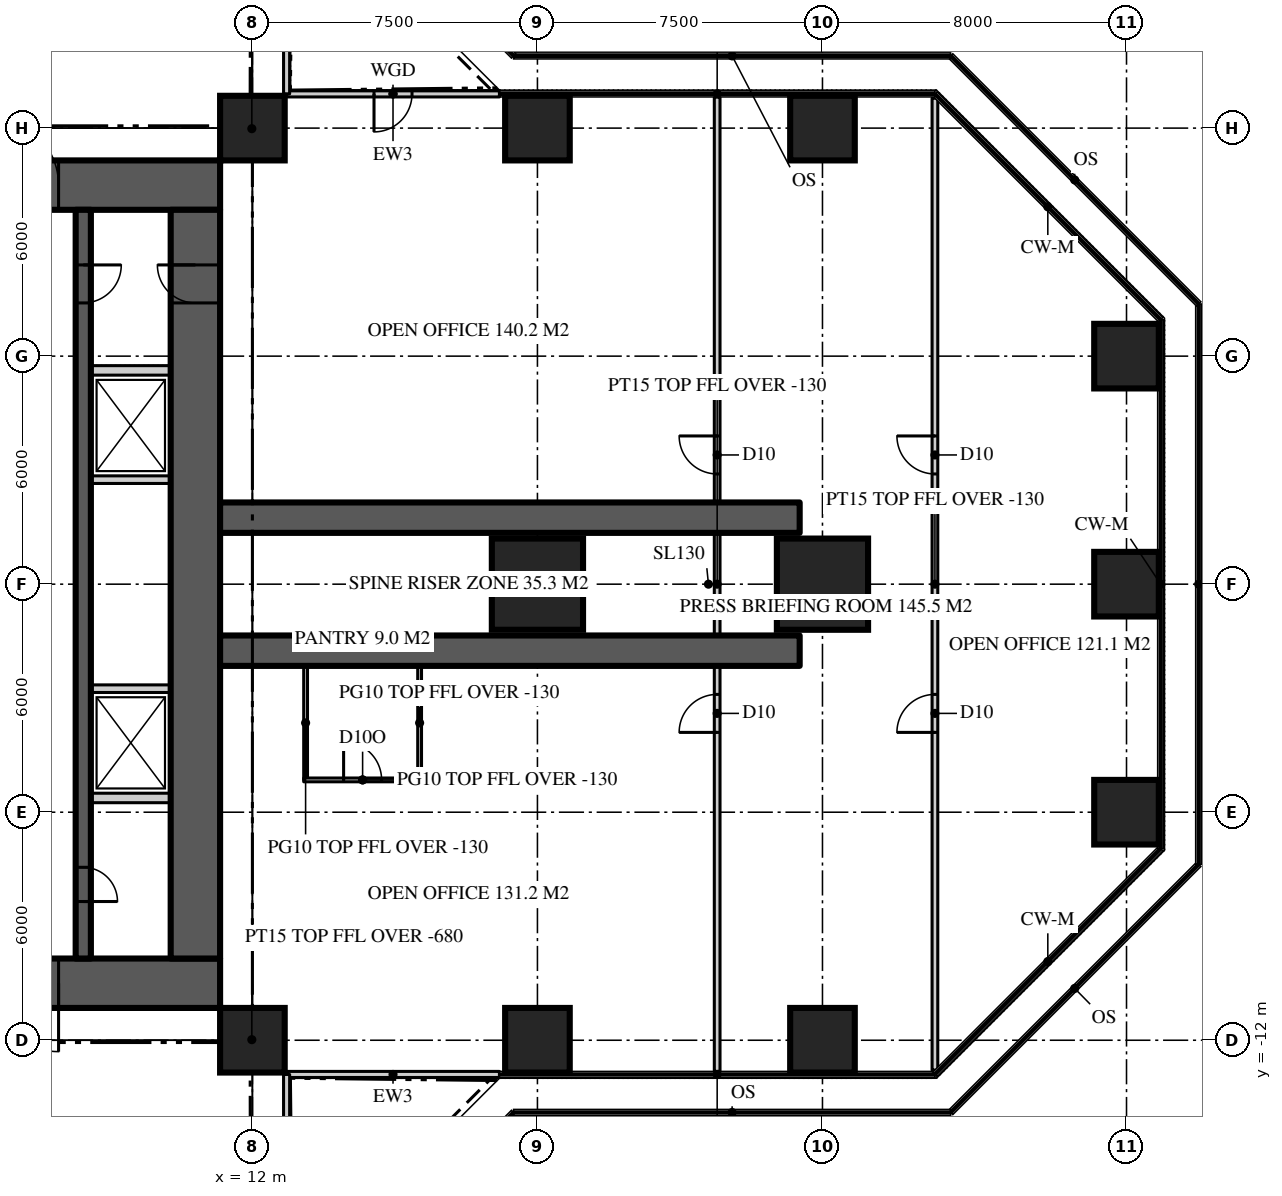
"""IFC4 building model, lengths in metres.
Left out: names, types, materials, properties, quantities, classifications, styles, units other than length and angle.
Written with IfcOpenShell. Run it as: python <this file> out.ifc"""

import sys

from ifc_helpers import new_model, si_unit, direction, frame, frame_2d, origin, origin_2d, place, context, subcontext, project, spatial, rectangle, extrude, element, fill, save


model = new_model("IFC4")
c1 = context("Model", 3, precision=1e-05, world=origin(), true_north=direction((0.0, 1.0)))
c2 = subcontext(c1, "Body", "Model", "MODEL_VIEW")
j1 = project(units=[si_unit("LENGTHUNIT", "METRE"), si_unit("PLANEANGLEUNIT", "RADIAN")], contexts=[c1])
p1 = place(None, origin())
s1 = spatial("IfcSite", under=j1, at=p1, CompositionType="ELEMENT")
p2 = place(p1, origin())
s2 = spatial("IfcBuilding", under=s1, at=p2, CompositionType="ELEMENT")
p3 = place(p2, frame((0.0, 0.0, 178.8)))
s3 = spatial("IfcBuildingStorey", under=s2, at=p3, CompositionType="ELEMENT", Elevation=178.8)
p4 = place(p3, frame((-11.15, 10.5, 0.0), z_axis=(0.0, 0.0, 1.0), x_axis=(1.0, 0.0, 0.0)))
e1 = element("IfcWall", 1, at=p4, inside=s3, PredefinedType="SHEAR", context=c2, shape_type="SweptSolid", body=[
    extrude(rectangle(XDim=22.3, YDim=1.3, at=frame_2d((11.15, 0.0))), origin(), (0.0, 0.0, 1.0), 3.9),
])
p5 = place(p4, frame((4.25, 0.0, 0.0)))
e2 = element("IfcOpeningElement", 2, at=p5, cuts=e1, PredefinedType="OPENING", context=c2, shape_type="SweptSolid", body=[
    extrude(rectangle(XDim=1.8, YDim=2.2, at=frame_2d((0.9, 1.1))), frame((0.0, 0.66, 0.0), z_axis=(0.0, -1.0, 0.0), x_axis=(1.0, 0.0, 0.0)), (0.0, 0.0, 1.0), 1.32),
])
p6 = place(p4, frame((16.25, 0.0, 0.0)))
e3 = element("IfcOpeningElement", 3, at=p6, cuts=e1, PredefinedType="OPENING", context=c2, shape_type="SweptSolid", body=[
    extrude(rectangle(XDim=1.8, YDim=2.2, at=frame_2d((0.9, 1.1))), frame((0.0, 0.66, 0.0), z_axis=(0.0, -1.0, 0.0), x_axis=(1.0, 0.0, 0.0)), (0.0, 0.0, 1.0), 1.32),
])
p7 = place(p3, frame((11.15, -10.5, 0.0), z_axis=(0.0, 0.0, 1.0), x_axis=(-1.0, 0.0, 0.0)))
e4 = element("IfcWall", 4, at=p7, inside=s3, PredefinedType="SHEAR", context=c2, shape_type="SweptSolid", body=[
    extrude(rectangle(XDim=22.3, YDim=1.3, at=frame_2d((11.15, 0.0))), origin(), (0.0, 0.0, 1.0), 3.9),
])
p8 = place(p7, frame((16.25, 0.0, 0.0)))
e5 = element("IfcOpeningElement", 5, at=p8, cuts=e4, PredefinedType="OPENING", context=c2, shape_type="SweptSolid", body=[
    extrude(rectangle(XDim=1.8, YDim=2.2, at=frame_2d((0.9, 1.1))), frame((0.0, 0.66, 0.0), z_axis=(0.0, -1.0, 0.0), x_axis=(1.0, 0.0, 0.0)), (0.0, 0.0, 1.0), 1.32),
])
p9 = place(p7, frame((4.25, 0.0, 0.0)))
e6 = element("IfcOpeningElement", 6, at=p9, cuts=e4, PredefinedType="OPENING", context=c2, shape_type="SweptSolid", body=[
    extrude(rectangle(XDim=1.8, YDim=2.2, at=frame_2d((0.9, 1.1))), frame((0.0, 0.66, 0.0), z_axis=(0.0, -1.0, 0.0), x_axis=(1.0, 0.0, 0.0)), (0.0, 0.0, 1.0), 1.32),
])
p10 = place(p3, frame((10.5, -9.85, 0.0), z_axis=(0.0, 0.0, 1.0), x_axis=(0.0, 1.0, 0.0)))
e7 = element("IfcWall", 7, at=p10, inside=s3, PredefinedType="SHEAR", context=c2, shape_type="SweptSolid", body=[
    extrude(rectangle(XDim=19.7, YDim=1.3, at=frame_2d((9.85, 0.0))), origin(), (0.0, 0.0, 1.0), 3.9),
])
p11 = place(p10, frame((17.25, 0.0, 0.0)))
e8 = element("IfcOpeningElement", 8, at=p11, cuts=e7, PredefinedType="OPENING", context=c2, shape_type="SweptSolid", body=[
    extrude(rectangle(XDim=1.0, YDim=2.2, at=frame_2d((0.5, 1.1))), frame((0.0, 0.66, 0.0), z_axis=(0.0, -1.0, 0.0), x_axis=(1.0, 0.0, 0.0)), (0.0, 0.0, 1.0), 1.32),
])
for number, where, z_axis, x_axis in (
    (9, (11.15, -1.75, 0.0), (0.0, 0.0, 1.0), (1.0, 0.0, 0.0)),
    (10, (11.15, 1.75, 0.0), (0.0, 0.0, 1.0), (1.0, 0.0, 0.0)),
):
    element("IfcWall", number, at=place(p3, frame(where, z_axis=z_axis, x_axis=x_axis)), inside=s3, PredefinedType="SHEAR", context=c2, shape_type="SweptSolid", body=[
        extrude(rectangle(XDim=15.25, YDim=0.8, at=frame_2d((7.625, 0.0))), origin(), (0.0, 0.0, 1.0), 3.9),
    ])
for number, where, z_axis, x_axis in (
    (11, (12.0, -12.0, 0.0), (0.0, 0.0, 1.0), (1.0, 0.0, 0.0)),
    (12, (19.5, -12.0, 0.0), (0.0, 0.0, 1.0), (1.0, 0.0, 0.0)),
    (13, (27.0, -12.0, 0.0), (0.0, 0.0, 1.0), (1.0, 0.0, 0.0)),
    (14, (35.0, -6.0, 0.0), (0.0, 0.0, 1.0), (1.0, 0.0, 0.0)),
):
    element("IfcColumn", number, at=place(p3, frame(where, z_axis=z_axis, x_axis=x_axis)), inside=s3, PredefinedType="COLUMN", context=c2, shape_type="SweptSolid", body=[
        extrude(rectangle(XDim=1.7, YDim=1.7, at=origin_2d()), origin(), (0.0, 0.0, 1.0), 3.9),
    ])
for number, where, z_axis, x_axis in (
    (15, (19.5, 0.0, 0.0), (0.0, 0.0, 1.0), (1.0, 0.0, 0.0)),
    (16, (27.0, 0.0, 0.0), (0.0, 0.0, 1.0), (1.0, 0.0, 0.0)),
):
    element("IfcColumn", number, at=place(p3, frame(where, z_axis=z_axis, x_axis=x_axis)), inside=s3, PredefinedType="COLUMN", context=c2, shape_type="SweptSolid", body=[
        extrude(rectangle(XDim=2.4, YDim=2.4, at=origin_2d()), origin(), (0.0, 0.0, 1.0), 3.9),
    ])
for number, where, z_axis, x_axis in (
    (17, (35.0, 0.0, 0.0), (0.0, 0.0, 1.0), (1.0, 0.0, 0.0)),
    (18, (35.0, 6.0, 0.0), (0.0, 0.0, 1.0), (1.0, 0.0, 0.0)),
    (19, (12.0, 12.0, 0.0), (0.0, 0.0, 1.0), (1.0, 0.0, 0.0)),
    (20, (19.5, 12.0, 0.0), (0.0, 0.0, 1.0), (1.0, 0.0, 0.0)),
    (21, (27.0, 12.0, 0.0), (0.0, 0.0, 1.0), (1.0, 0.0, 0.0)),
):
    element("IfcColumn", number, at=place(p3, frame(where, z_axis=z_axis, x_axis=x_axis)), inside=s3, PredefinedType="COLUMN", context=c2, shape_type="SweptSolid", body=[
        extrude(rectangle(XDim=1.7, YDim=1.7, at=origin_2d()), origin(), (0.0, 0.0, 1.0), 3.9),
    ])
p12 = place(p3, frame((12.9, -12.9, 0.0), z_axis=(0.0, 0.0, 1.0), x_axis=(1.0, 0.0, 0.0)))
e22 = element("IfcWall", 22, at=p12, inside=s3, PredefinedType="SOLIDWALL", context=c2, shape_type="SweptSolid", body=[
    extrude(rectangle(XDim=5.6, YDim=0.16, at=frame_2d((2.8, 0.0))), origin(), (0.0, 0.0, 1.0), 3.77),
])
p13 = place(p3, frame((18.5, 12.9, 0.0), z_axis=(0.0, 0.0, 1.0), x_axis=(-1.0, 0.0, 0.0)))
e23 = element("IfcWall", 23, at=p13, inside=s3, PredefinedType="SOLIDWALL", context=c2, shape_type="SweptSolid", body=[
    extrude(rectangle(XDim=5.6, YDim=0.16, at=frame_2d((2.8, 0.0))), origin(), (0.0, 0.0, 1.0), 3.77),
])
p14 = place(p13, frame((2.3, 0.0, 0.0)))
e24 = element("IfcOpeningElement", 24, at=p14, cuts=e23, PredefinedType="OPENING", context=c2, shape_type="SweptSolid", body=[
    extrude(rectangle(XDim=1.0, YDim=2.2, at=frame_2d((0.5, 1.1))), frame((0.0, 0.09, 0.0), z_axis=(0.0, -1.0, 0.0), x_axis=(1.0, 0.0, 0.0)), (0.0, 0.0, 1.0), 0.18),
])
p15 = place(p3, frame((12.9, 12.9, 0.0), z_axis=(0.0, 0.0, 1.0), x_axis=(0.0, 1.0, 0.0)))
e25 = element("IfcWall", 25, at=p15, inside=s3, PredefinedType="SOLIDWALL", context=c2, shape_type="SweptSolid", body=[
    extrude(rectangle(XDim=5.6, YDim=0.16, at=frame_2d((2.8, 0.0))), origin(), (0.0, 0.0, 1.0), 3.77),
])
p16 = place(p3, frame((12.9, -18.5, 0.0), z_axis=(0.0, 0.0, 1.0), x_axis=(0.0, 1.0, 0.0)))
e26 = element("IfcWall", 26, at=p16, inside=s3, PredefinedType="SOLIDWALL", context=c2, shape_type="SweptSolid", body=[
    extrude(rectangle(XDim=5.6, YDim=0.16, at=frame_2d((2.8, 0.0))), origin(), (0.0, 0.0, 1.0), 3.77),
])
p17 = place(p16, frame((2.3, 0.0, 0.0)))
e27 = element("IfcOpeningElement", 27, at=p17, cuts=e26, PredefinedType="OPENING", context=c2, shape_type="SweptSolid", body=[
    extrude(rectangle(XDim=1.0, YDim=2.2, at=frame_2d((0.5, 1.1))), frame((0.0, 0.09, 0.0), z_axis=(0.0, -1.0, 0.0), x_axis=(1.0, 0.0, 0.0)), (0.0, 0.0, 1.0), 0.18),
])
p18 = place(p3, frame((7.55, 9.85, 0.0), z_axis=(0.0, 0.0, 1.0), x_axis=(0.0, -1.0, 0.0)))
e28 = element("IfcWall", 28, at=p18, inside=s3, PredefinedType="SHEAR", context=c2, shape_type="SweptSolid", body=[
    extrude(rectangle(XDim=19.7, YDim=0.4, at=frame_2d((9.85, 0.0))), origin(), (0.0, 0.0, 1.0), 3.9),
])
p19 = place(p18, frame((1.45, 0.0, 0.0)))
e29 = element("IfcOpeningElement", 29, at=p19, cuts=e28, PredefinedType="OPENING", context=c2, shape_type="SweptSolid", body=[
    extrude(rectangle(XDim=1.0, YDim=2.2, at=frame_2d((0.5, 1.1))), frame((0.0, 0.21, 0.0), z_axis=(0.0, -1.0, 0.0), x_axis=(1.0, 0.0, 0.0)), (0.0, 0.0, 1.0), 0.42),
])
p20 = place(p18, frame((17.3, 0.0, 0.0)))
e30 = element("IfcOpeningElement", 30, at=p20, cuts=e28, PredefinedType="OPENING", context=c2, shape_type="SweptSolid", body=[
    extrude(rectangle(XDim=0.9, YDim=2.1, at=frame_2d((0.45, 1.05))), frame((0.0, 0.21, 0.0), z_axis=(0.0, -1.0, 0.0), x_axis=(1.0, 0.0, 0.0)), (0.0, 0.0, 1.0), 0.42),
])
for number, where, z_axis, x_axis in (
    (31, (7.75, 5.625, 0.0), (0.0, 0.0, 1.0), (1.0, 0.0, 0.0)),
    (32, (7.75, -5.625, 0.0), (0.0, 0.0, 1.0), (1.0, 0.0, 0.0)),
):
    element("IfcWall", number, at=place(p3, frame(where, z_axis=z_axis, x_axis=x_axis)), inside=s3, PredefinedType="SOLIDWALL", context=c2, shape_type="SweptSolid", body=[
        extrude(rectangle(XDim=2.1, YDim=0.25, at=frame_2d((1.05, 0.0))), origin(), (0.0, 0.0, 1.0), 3.7),
    ])
for number, where, z_axis, x_axis in (
    (33, (7.75, -2.75, 0.0), (0.0, 0.0, 1.0), (1.0, 0.0, 0.0)),
    (34, (7.75, 2.75, 0.0), (0.0, 0.0, 1.0), (1.0, 0.0, 0.0)),
):
    element("IfcWall", number, at=place(p3, frame(where, z_axis=z_axis, x_axis=x_axis)), inside=s3, PredefinedType="SOLIDWALL", context=c2, shape_type="SweptSolid", body=[
        extrude(rectangle(XDim=2.1, YDim=0.2, at=frame_2d((1.05, 0.0))), origin(), (0.0, 0.0, 1.0), 3.7),
    ])
p21 = place(p3, frame((24.229, -12.82, 0.0), z_axis=(0.0, 0.0, 1.0), x_axis=(0.0, 1.0, 0.0)))
e35 = element("IfcWall", 35, at=p21, inside=s3, PredefinedType="PARTITIONING", context=c2, shape_type="SweptSolid", body=[
    extrude(rectangle(XDim=25.64, YDim=0.15, at=frame_2d((12.82, 0.0))), origin(), (0.0, 0.0, 1.0), 3.77),
])
p22 = place(p21, frame((15.72, 0.0, 0.0)))
e36 = element("IfcOpeningElement", 36, at=p22, cuts=e35, PredefinedType="OPENING", context=c2, shape_type="SweptSolid", body=[
    extrude(rectangle(XDim=1.0, YDim=2.2, at=frame_2d((0.5, 1.1))), frame((0.0, 0.085, 0.0), z_axis=(0.0, -1.0, 0.0), x_axis=(1.0, 0.0, 0.0)), (0.0, 0.0, 1.0), 0.17),
])
p23 = place(p21, frame((8.92, 0.0, 0.0)))
e37 = element("IfcOpeningElement", 37, at=p23, cuts=e35, PredefinedType="OPENING", context=c2, shape_type="SweptSolid", body=[
    extrude(rectangle(XDim=1.0, YDim=2.2, at=frame_2d((0.5, 1.1))), frame((0.0, 0.085, 0.0), z_axis=(0.0, -1.0, 0.0), x_axis=(1.0, 0.0, 0.0)), (0.0, 0.0, 1.0), 0.17),
])
p24 = place(p3, frame((29.959, -12.786, 0.0), z_axis=(0.0, 0.0, 1.0), x_axis=(0.0, 1.0, 0.0)))
e38 = element("IfcWall", 38, at=p24, inside=s3, PredefinedType="PARTITIONING", context=c2, shape_type="SweptSolid", body=[
    extrude(rectangle(XDim=25.573, YDim=0.15, at=frame_2d((12.786, 0.0))), origin(), (0.0, 0.0, 1.0), 3.77),
])
p25 = place(p24, frame((15.687, 0.0, 0.0)))
e39 = element("IfcOpeningElement", 39, at=p25, cuts=e38, PredefinedType="OPENING", context=c2, shape_type="SweptSolid", body=[
    extrude(rectangle(XDim=1.0, YDim=2.2, at=frame_2d((0.5, 1.1))), frame((0.0, 0.085, 0.0), z_axis=(0.0, -1.0, 0.0), x_axis=(1.0, 0.0, 0.0)), (0.0, 0.0, 1.0), 0.17),
])
p26 = place(p24, frame((8.886, 0.0, 0.0)))
e40 = element("IfcOpeningElement", 40, at=p26, cuts=e38, PredefinedType="OPENING", context=c2, shape_type="SweptSolid", body=[
    extrude(rectangle(XDim=1.0, YDim=2.2, at=frame_2d((0.5, 1.1))), frame((0.0, 0.085, 0.0), z_axis=(0.0, -1.0, 0.0), x_axis=(1.0, 0.0, 0.0)), (0.0, 0.0, 1.0), 0.17),
])
for number, where, z_axis, x_axis in (
    (41, (13.4, -2.15, 0.0), (0.0, 0.0, 1.0), (0.0, -1.0, 0.0)),
    (42, (16.4, -2.15, 0.0), (0.0, 0.0, 1.0), (0.0, -1.0, 0.0)),
):
    element("IfcWall", number, at=place(p3, frame(where, z_axis=z_axis, x_axis=x_axis)), inside=s3, PredefinedType="PARTITIONING", context=c2, shape_type="SweptSolid", body=[
        extrude(rectangle(XDim=3.0, YDim=0.1, at=frame_2d((1.5, 0.0))), origin(), (0.0, 0.0, 1.0), 3.77),
    ])
p27 = place(p3, frame((13.35, -5.15, 0.0), z_axis=(0.0, 0.0, 1.0), x_axis=(1.0, 0.0, 0.0)))
e43 = element("IfcWall", 43, at=p27, inside=s3, PredefinedType="PARTITIONING", context=c2, shape_type="SweptSolid", body=[
    extrude(rectangle(XDim=3.1, YDim=0.1, at=frame_2d((1.55, 0.0))), origin(), (0.0, 0.0, 1.0), 3.77),
])
p28 = place(p27, frame((1.05, 0.0, 0.0)))
e44 = element("IfcOpeningElement", 44, at=p28, cuts=e43, PredefinedType="OPENING", context=c2, shape_type="SweptSolid", body=[
    extrude(rectangle(XDim=1.0, YDim=2.2, at=frame_2d((0.5, 1.1))), frame((0.0, 0.06, 0.0), z_axis=(0.0, -1.0, 0.0), x_axis=(1.0, 0.0, 0.0)), (0.0, 0.0, 1.0), 0.12),
])
for number, where, z_axis, x_axis in (
    (45, (11.15, 11.15, 0.0), (0.0, 0.0, 1.0), (0.707, 0.707, 0.0)),
    (46, (11.15, -11.15, 0.0), (0.0, 0.0, 1.0), (0.707, -0.707, 0.0)),
):
    element("IfcWall", number, at=place(p3, frame(where, z_axis=z_axis, x_axis=x_axis)), inside=s3, PredefinedType="PARTITIONING", context=c2, shape_type="SweptSolid", body=[
        extrude(rectangle(XDim=2.362, YDim=0.15, at=frame_2d((1.181, 0.0))), origin(), (0.0, 0.0, 1.0), 3.22),
    ])
p29 = place(p14, origin())
e47 = element("IfcDoor", 47, at=p29, inside=s3, OperationType="SINGLE_SWING_RIGHT", PredefinedType="DOOR", context=c2, shape_type="SweptSolid", body=[
    extrude(rectangle(XDim=1.0, YDim=2.2, at=frame_2d((0.5, 1.1))), frame((0.0, 0.025, 0.0), z_axis=(0.0, -1.0, 0.0), x_axis=(1.0, 0.0, 0.0)), (0.0, 0.0, 1.0), 0.05),
])
fill(e24, e47)
p30 = place(p6, origin())
e48 = element("IfcDoor", 48, at=p30, inside=s3, OperationType="DOUBLE_DOOR_DOUBLE_SWING", PredefinedType="DOOR", context=c2, shape_type="SweptSolid", body=[
    extrude(rectangle(XDim=1.8, YDim=2.2, at=frame_2d((0.9, 1.1))), frame((0.0, 0.025, 0.0), z_axis=(0.0, -1.0, 0.0), x_axis=(1.0, 0.0, 0.0)), (0.0, 0.0, 1.0), 0.05),
])
fill(e3, e48)
p31 = place(p9, origin())
e49 = element("IfcDoor", 49, at=p31, inside=s3, OperationType="DOUBLE_DOOR_DOUBLE_SWING", PredefinedType="DOOR", context=c2, shape_type="SweptSolid", body=[
    extrude(rectangle(XDim=1.8, YDim=2.2, at=frame_2d((0.9, 1.1))), frame((0.0, 0.025, 0.0), z_axis=(0.0, -1.0, 0.0), x_axis=(1.0, 0.0, 0.0)), (0.0, 0.0, 1.0), 0.05),
])
fill(e6, e49)
p32 = place(p19, origin())
e50 = element("IfcDoor", 50, at=p32, inside=s3, OperationType="SINGLE_SWING_LEFT", PredefinedType="DOOR", context=c2, shape_type="SweptSolid", body=[
    extrude(rectangle(XDim=1.0, YDim=2.2, at=frame_2d((0.5, 1.1))), frame((0.0, 0.025, 0.0), z_axis=(0.0, -1.0, 0.0), x_axis=(1.0, 0.0, 0.0)), (0.0, 0.0, 1.0), 0.05),
])
fill(e29, e50)
p33 = place(p11, origin())
e51 = element("IfcDoor", 51, at=p33, inside=s3, OperationType="SINGLE_SWING_RIGHT", PredefinedType="DOOR", context=c2, shape_type="SweptSolid", body=[
    extrude(rectangle(XDim=1.0, YDim=2.2, at=frame_2d((0.5, 1.1))), frame((0.0, 0.025, 0.0), z_axis=(0.0, -1.0, 0.0), x_axis=(1.0, 0.0, 0.0)), (0.0, 0.0, 1.0), 0.05),
])
fill(e8, e51)
p34 = place(p20, origin())
e52 = element("IfcDoor", 52, at=p34, inside=s3, OperationType="SINGLE_SWING_RIGHT", PredefinedType="DOOR", context=c2, shape_type="SweptSolid", body=[
    extrude(rectangle(XDim=0.9, YDim=2.1, at=frame_2d((0.45, 1.05))), frame((0.0, 0.025, 0.0), z_axis=(0.0, -1.0, 0.0), x_axis=(1.0, 0.0, 0.0)), (0.0, 0.0, 1.0), 0.05),
])
fill(e30, e52)
p35 = place(p22, origin())
e53 = element("IfcDoor", 53, at=p35, inside=s3, OperationType="SINGLE_SWING_RIGHT", PredefinedType="DOOR", context=c2, shape_type="SweptSolid", body=[
    extrude(rectangle(XDim=1.0, YDim=2.2, at=frame_2d((0.5, 1.1))), frame((0.0, 0.025, 0.0), z_axis=(0.0, -1.0, 0.0), x_axis=(1.0, 0.0, 0.0)), (0.0, 0.0, 1.0), 0.05),
])
fill(e36, e53)
p36 = place(p23, origin())
e54 = element("IfcDoor", 54, at=p36, inside=s3, OperationType="SINGLE_SWING_LEFT", PredefinedType="DOOR", context=c2, shape_type="SweptSolid", body=[
    extrude(rectangle(XDim=1.0, YDim=2.2, at=frame_2d((0.5, 1.1))), frame((0.0, 0.025, 0.0), z_axis=(0.0, -1.0, 0.0), x_axis=(1.0, 0.0, 0.0)), (0.0, 0.0, 1.0), 0.05),
])
fill(e37, e54)
p37 = place(p25, origin())
e55 = element("IfcDoor", 55, at=p37, inside=s3, OperationType="SINGLE_SWING_RIGHT", PredefinedType="DOOR", context=c2, shape_type="SweptSolid", body=[
    extrude(rectangle(XDim=1.0, YDim=2.2, at=frame_2d((0.5, 1.1))), frame((0.0, 0.025, 0.0), z_axis=(0.0, -1.0, 0.0), x_axis=(1.0, 0.0, 0.0)), (0.0, 0.0, 1.0), 0.05),
])
fill(e39, e55)
p38 = place(p26, origin())
e56 = element("IfcDoor", 56, at=p38, inside=s3, OperationType="SINGLE_SWING_LEFT", PredefinedType="DOOR", context=c2, shape_type="SweptSolid", body=[
    extrude(rectangle(XDim=1.0, YDim=2.2, at=frame_2d((0.5, 1.1))), frame((0.0, 0.025, 0.0), z_axis=(0.0, -1.0, 0.0), x_axis=(1.0, 0.0, 0.0)), (0.0, 0.0, 1.0), 0.05),
])
fill(e40, e56)
p39 = place(p28, origin())
e57 = element("IfcDoor", 57, at=p39, inside=s3, OperationType="SINGLE_SWING_LEFT", PredefinedType="DOOR", context=c2, shape_type="SweptSolid", body=[
    extrude(rectangle(XDim=1.0, YDim=2.2, at=frame_2d((0.5, 1.1))), frame((0.0, 0.025, 0.0), z_axis=(0.0, -1.0, 0.0), x_axis=(1.0, 0.0, 0.0)), (0.0, 0.0, 1.0), 0.05),
])
fill(e44, e57)
save(model, sys.argv[1])
